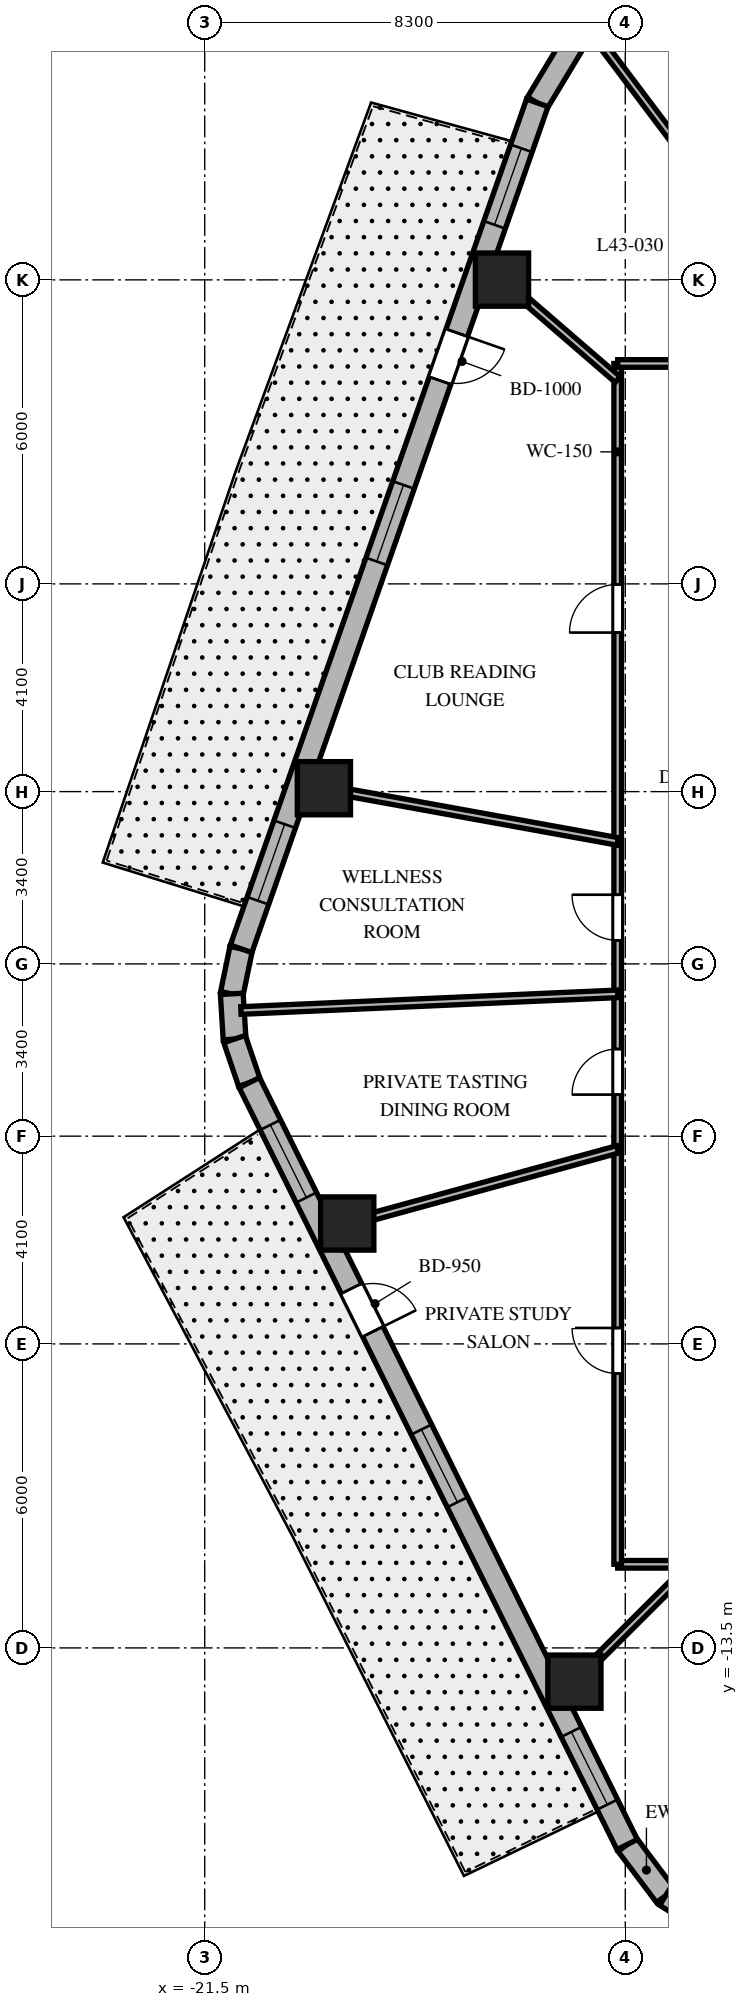
"""IFC4 building model, lengths in metres.
Left out: names, types, materials, properties, quantities, classifications, styles, units other than length and angle.
Written with IfcOpenShell. Run it as: python <this file> out.ifc"""

import sys

from ifc_helpers import new_model, si_unit, direction, frame, frame_2d, origin, origin_2d, place, context, subcontext, project, spatial, rectangle, extrude, element, fill, save


model = new_model("IFC4")
c1 = context("Model", 3, precision=1e-05, world=origin(), true_north=direction((0.0, 1.0)))
c2 = subcontext(c1, "Body", "Model", "MODEL_VIEW")
j1 = project(units=[si_unit("LENGTHUNIT", "METRE"), si_unit("PLANEANGLEUNIT", "RADIAN")], contexts=[c1])
p1 = place(None, origin())
s1 = spatial("IfcSite", under=j1, at=p1, CompositionType="ELEMENT")
p2 = place(p1, origin())
s2 = spatial("IfcBuilding", under=s1, at=p2, CompositionType="ELEMENT")
p3 = place(p2, frame((0.0, 0.0, 175.6)))
s3 = spatial("IfcBuildingStorey", under=s2, at=p3, CompositionType="ELEMENT", Elevation=175.6)
for number, where, z_axis, x_axis in (
    (1, (-15.633, 13.505, 0.0), (0.0, 0.0, 1.0), (1.0, 0.0, 0.0)),
    (2, (-19.148, 3.467, 0.0), (0.0, 0.0, 1.0), (1.0, 0.0, 0.0)),
    (3, (-18.687, -5.124, 0.0), (0.0, 0.0, 1.0), (1.0, 0.0, 0.0)),
    (4, (-14.204, -14.166, 0.0), (0.0, 0.0, 1.0), (1.0, 0.0, 0.0)),
):
    element("IfcColumn", number, at=place(p3, frame(where, z_axis=z_axis, x_axis=x_axis)), inside=s3, PredefinedType="COLUMN", context=c2, shape_type="SweptSolid", body=[
        extrude(rectangle(XDim=1.05, YDim=1.05, at=origin_2d()), origin(), (0.0, 0.0, 1.0), 3.7),
    ])
p4 = place(p3, frame((-13.162, -17.381, 0.0), z_axis=(0.0, 0.0, 1.0), x_axis=(0.601515770517, -0.798860925205, 0.0)))
e5 = element("IfcWall", 5, at=p4, inside=s3, PredefinedType="SOLIDWALL", context=c2, shape_type="SweptSolid", body=[
    extrude(rectangle(XDim=1.262, YDim=0.45, at=frame_2d((0.631, 0.0))), origin(), (0.0, 0.0, 1.0), 3.4),
])
p5 = place(p3, frame((-12.403, -18.389, 0.0), z_axis=(0.0, 0.0, 1.0), x_axis=(0.849795170926, -0.527113049991, 0.0)))
e6 = element("IfcWall", 6, at=p5, inside=s3, PredefinedType="SOLIDWALL", context=c2, shape_type="SweptSolid", body=[
    extrude(rectangle(XDim=1.241, YDim=0.45, at=frame_2d((0.62, 0.0))), origin(), (0.0, 0.0, 1.0), 3.4),
])
p6 = place(p3, frame((-14.214, 18.192, 0.0), z_axis=(0.0, 0.0, 1.0), x_axis=(-0.516340945502, -0.856383108193, 0.0)))
e7 = element("IfcWall", 7, at=p6, inside=s3, PredefinedType="SOLIDWALL", context=c2, shape_type="SweptSolid", body=[
    extrude(rectangle(XDim=1.4, YDim=0.45, at=frame_2d((0.7, 0.0))), origin(), (0.0, 0.0, 1.0), 3.4),
])
p7 = place(p3, frame((-20.782, 0.298, 0.0), z_axis=(0.0, 0.0, 1.0), x_axis=(-0.202570068411, -0.979267771033, 0.0)))
e8 = element("IfcWall", 8, at=p7, inside=s3, PredefinedType="SOLIDWALL", context=c2, shape_type="SweptSolid", body=[
    extrude(rectangle(XDim=0.909, YDim=0.45, at=frame_2d((0.454, 0.0))), origin(), (0.0, 0.0, 1.0), 3.4),
])
p8 = place(p3, frame((-20.966, -0.592, 0.0), z_axis=(0.0, 0.0, 1.0), x_axis=(0.061748898935, -0.998091715966, 0.0)))
e9 = element("IfcWall", 9, at=p8, inside=s3, PredefinedType="SOLIDWALL", context=c2, shape_type="SweptSolid", body=[
    extrude(rectangle(XDim=0.894, YDim=0.45, at=frame_2d((0.447, 0.0))), origin(), (0.0, 0.0, 1.0), 3.4),
])
p9 = place(p3, frame((-20.911, -1.484, 0.0), z_axis=(0.0, 0.0, 1.0), x_axis=(0.321623334353, -0.946867694453, 0.0)))
e10 = element("IfcWall", 10, at=p9, inside=s3, PredefinedType="SOLIDWALL", context=c2, shape_type="SweptSolid", body=[
    extrude(rectangle(XDim=0.909, YDim=0.45, at=frame_2d((0.454, 0.0))), origin(), (0.0, 0.0, 1.0), 3.4),
])
p10 = place(p3, frame((-14.937, 16.993, 0.0), z_axis=(0.0, 0.0, 1.0), x_axis=(-0.330431575061, -0.943829949834, 0.0)))
e11 = element("IfcWall", 11, at=p10, inside=s3, PredefinedType="SOLIDWALL", context=c2, shape_type="SweptSolid", body=[
    extrude(rectangle(XDim=17.689, YDim=0.45, at=frame_2d((8.844, 0.0))), origin(), (0.0, 0.0, 1.0), 3.4),
])
p11 = place(p10, frame((4.807, 0.0, 0.0)))
e12 = element("IfcOpeningElement", 12, at=p11, cuts=e11, PredefinedType="OPENING", context=c2, shape_type="SweptSolid", body=[
    extrude(rectangle(XDim=1.0, YDim=2.15, at=frame_2d((0.5, 1.075))), frame((0.0, 0.235, 0.0), z_axis=(0.0, -1.0, 0.0), x_axis=(1.0, 0.0, 0.0)), (0.0, 0.0, 1.0), 0.47),
])
p12 = place(p10, frame((0.95, 0.0, 0.8)))
e13 = element("IfcOpeningElement", 13, at=p12, cuts=e11, PredefinedType="OPENING", context=c2, shape_type="SweptSolid", body=[
    extrude(rectangle(XDim=1.6, YDim=1.75, at=frame_2d((0.8, 0.875))), frame((0.0, 0.235, 0.0), z_axis=(0.0, -1.0, 0.0), x_axis=(1.0, 0.0, 0.0)), (0.0, 0.0, 1.0), 0.47),
])
p13 = place(p10, frame((7.99, 0.0, 0.8)))
e14 = element("IfcOpeningElement", 14, at=p13, cuts=e11, PredefinedType="OPENING", context=c2, shape_type="SweptSolid", body=[
    extrude(rectangle(XDim=1.6, YDim=1.75, at=frame_2d((0.8, 0.875))), frame((0.0, 0.235, 0.0), z_axis=(0.0, -1.0, 0.0), x_axis=(1.0, 0.0, 0.0)), (0.0, 0.0, 1.0), 0.47),
])
p14 = place(p10, frame((15.084, 0.0, 0.8)))
e15 = element("IfcOpeningElement", 15, at=p14, cuts=e11, PredefinedType="OPENING", context=c2, shape_type="SweptSolid", body=[
    extrude(rectangle(XDim=1.6, YDim=1.75, at=frame_2d((0.8, 0.875))), frame((0.0, 0.235, 0.0), z_axis=(0.0, -1.0, 0.0), x_axis=(1.0, 0.0, 0.0)), (0.0, 0.0, 1.0), 0.47),
])
p15 = place(p3, frame((-20.618, -2.344, 0.0), z_axis=(0.0, 0.0, 1.0), x_axis=(0.444243691097, -0.895905990002, 0.0)))
e16 = element("IfcWall", 16, at=p15, inside=s3, PredefinedType="SOLIDWALL", context=c2, shape_type="SweptSolid", body=[
    extrude(rectangle(XDim=16.784, YDim=0.45, at=frame_2d((8.392, 0.0))), origin(), (0.0, 0.0, 1.0), 3.4),
])
p16 = place(p15, frame((4.535, 0.0, 0.0)))
e17 = element("IfcOpeningElement", 17, at=p16, cuts=e16, PredefinedType="OPENING", context=c2, shape_type="SweptSolid", body=[
    extrude(rectangle(XDim=0.95, YDim=2.15, at=frame_2d((0.475, 1.075))), frame((0.0, 0.235, 0.0), z_axis=(0.0, -1.0, 0.0), x_axis=(1.0, 0.0, 0.0)), (0.0, 0.0, 1.0), 0.47),
])
p17 = place(p15, frame((0.931, 0.0, 0.8)))
e18 = element("IfcOpeningElement", 18, at=p17, cuts=e16, PredefinedType="OPENING", context=c2, shape_type="SweptSolid", body=[
    extrude(rectangle(XDim=1.6, YDim=1.75, at=frame_2d((0.8, 0.875))), frame((0.0, 0.235, 0.0), z_axis=(0.0, -1.0, 0.0), x_axis=(1.0, 0.0, 0.0)), (0.0, 0.0, 1.0), 0.47),
])
p18 = place(p15, frame((7.642, 0.0, 0.8)))
e19 = element("IfcOpeningElement", 19, at=p18, cuts=e16, PredefinedType="OPENING", context=c2, shape_type="SweptSolid", body=[
    extrude(rectangle(XDim=1.6, YDim=1.75, at=frame_2d((0.8, 0.875))), frame((0.0, 0.235, 0.0), z_axis=(0.0, -1.0, 0.0), x_axis=(1.0, 0.0, 0.0)), (0.0, 0.0, 1.0), 0.47),
])
p19 = place(p15, frame((14.303, 0.0, 0.8)))
e20 = element("IfcOpeningElement", 20, at=p19, cuts=e16, PredefinedType="OPENING", context=c2, shape_type="SweptSolid", body=[
    extrude(rectangle(XDim=1.6, YDim=1.75, at=frame_2d((0.8, 0.875))), frame((0.0, 0.235, 0.0), z_axis=(0.0, -1.0, 0.0), x_axis=(1.0, 0.0, 0.0)), (0.0, 0.0, 1.0), 0.47),
])
p20 = place(p3, frame((13.35, -11.85, 0.0), z_axis=(0.0, 0.0, 1.0), x_axis=(-1.0, 0.0, 0.0)))
e21 = element("IfcWall", 21, at=p20, inside=s3, PredefinedType="PARTITIONING", context=c2, shape_type="SweptSolid", body=[
    extrude(rectangle(XDim=26.7, YDim=0.15, at=frame_2d((13.35, 0.0))), origin(), (0.0, 0.0, 1.0), 2.84),
])
p21 = place(p20, frame((22.7, 0.0, 0.0)))
e22 = element("IfcOpeningElement", 22, at=p21, cuts=e21, PredefinedType="OPENING", context=c2, shape_type="SweptSolid", body=[
    extrude(rectangle(XDim=0.9, YDim=2.03, at=frame_2d((0.45, 1.015))), frame((0.0, 0.085, 0.0), z_axis=(0.0, -1.0, 0.0), x_axis=(1.0, 0.0, 0.0)), (0.0, 0.0, 1.0), 0.17),
])
p22 = place(p20, frame((18.523, 0.0, 0.0)))
e23 = element("IfcOpeningElement", 23, at=p22, cuts=e21, PredefinedType="OPENING", context=c2, shape_type="SweptSolid", body=[
    extrude(rectangle(XDim=0.95, YDim=2.03, at=frame_2d((0.475, 1.015))), frame((0.0, 0.085, 0.0), z_axis=(0.0, -1.0, 0.0), x_axis=(1.0, 0.0, 0.0)), (0.0, 0.0, 1.0), 0.17),
])
p23 = place(p20, frame((14.469, 0.0, 0.0)))
e24 = element("IfcOpeningElement", 24, at=p23, cuts=e21, PredefinedType="OPENING", context=c2, shape_type="SweptSolid", body=[
    extrude(rectangle(XDim=0.95, YDim=2.03, at=frame_2d((0.475, 1.015))), frame((0.0, 0.085, 0.0), z_axis=(0.0, -1.0, 0.0), x_axis=(1.0, 0.0, 0.0)), (0.0, 0.0, 1.0), 0.17),
])
p24 = place(p20, frame((10.314, 0.0, 0.0)))
e25 = element("IfcOpeningElement", 25, at=p24, cuts=e21, PredefinedType="OPENING", context=c2, shape_type="SweptSolid", body=[
    extrude(rectangle(XDim=0.95, YDim=2.03, at=frame_2d((0.475, 1.015))), frame((0.0, 0.085, 0.0), z_axis=(0.0, -1.0, 0.0), x_axis=(1.0, 0.0, 0.0)), (0.0, 0.0, 1.0), 0.17),
])
p25 = place(p20, frame((3.995, 0.0, 0.0)))
e26 = element("IfcOpeningElement", 26, at=p25, cuts=e21, PredefinedType="OPENING", context=c2, shape_type="SweptSolid", body=[
    extrude(rectangle(XDim=0.95, YDim=2.03, at=frame_2d((0.475, 1.015))), frame((0.0, 0.085, 0.0), z_axis=(0.0, -1.0, 0.0), x_axis=(1.0, 0.0, 0.0)), (0.0, 0.0, 1.0), 0.17),
])
p26 = place(p3, frame((-13.35, -11.85, 0.0), z_axis=(0.0, 0.0, 1.0), x_axis=(0.0, 1.0, 0.0)))
e27 = element("IfcWall", 27, at=p26, inside=s3, PredefinedType="PARTITIONING", context=c2, shape_type="SweptSolid", body=[
    extrude(rectangle(XDim=23.7, YDim=0.15, at=frame_2d((11.85, 0.0))), origin(), (0.0, 0.0, 1.0), 2.84),
])
p27 = place(p26, frame((18.389, 0.0, 0.0)))
e28 = element("IfcOpeningElement", 28, at=p27, cuts=e27, PredefinedType="OPENING", context=c2, shape_type="SweptSolid", body=[
    extrude(rectangle(XDim=0.95, YDim=2.03, at=frame_2d((0.475, 1.015))), frame((0.0, 0.085, 0.0), z_axis=(0.0, -1.0, 0.0), x_axis=(1.0, 0.0, 0.0)), (0.0, 0.0, 1.0), 0.17),
])
p28 = place(p26, frame((12.315, 0.0, 0.0)))
e29 = element("IfcOpeningElement", 29, at=p28, cuts=e27, PredefinedType="OPENING", context=c2, shape_type="SweptSolid", body=[
    extrude(rectangle(XDim=0.9, YDim=2.03, at=frame_2d((0.45, 1.015))), frame((0.0, 0.085, 0.0), z_axis=(0.0, -1.0, 0.0), x_axis=(1.0, 0.0, 0.0)), (0.0, 0.0, 1.0), 0.17),
])
p29 = place(p26, frame((9.27, 0.0, 0.0)))
e30 = element("IfcOpeningElement", 30, at=p29, cuts=e27, PredefinedType="OPENING", context=c2, shape_type="SweptSolid", body=[
    extrude(rectangle(XDim=0.9, YDim=2.03, at=frame_2d((0.45, 1.015))), frame((0.0, 0.085, 0.0), z_axis=(0.0, -1.0, 0.0), x_axis=(1.0, 0.0, 0.0)), (0.0, 0.0, 1.0), 0.17),
])
p30 = place(p26, frame((3.765, 0.0, 0.0)))
e31 = element("IfcOpeningElement", 31, at=p30, cuts=e27, PredefinedType="OPENING", context=c2, shape_type="SweptSolid", body=[
    extrude(rectangle(XDim=0.9, YDim=2.03, at=frame_2d((0.45, 1.015))), frame((0.0, 0.085, 0.0), z_axis=(0.0, -1.0, 0.0), x_axis=(1.0, 0.0, 0.0)), (0.0, 0.0, 1.0), 0.17),
])
p31 = place(p3, frame((-13.35, 11.85, 0.0), z_axis=(0.0, 0.0, 1.0), x_axis=(1.0, 0.0, 0.0)))
e32 = element("IfcWall", 32, at=p31, inside=s3, PredefinedType="PARTITIONING", context=c2, shape_type="SweptSolid", body=[
    extrude(rectangle(XDim=26.7, YDim=0.15, at=frame_2d((13.35, 0.0))), origin(), (0.0, 0.0, 1.0), 2.84),
])
p32 = place(p31, frame((22.7, 0.0, 0.0)))
e33 = element("IfcOpeningElement", 33, at=p32, cuts=e32, PredefinedType="OPENING", context=c2, shape_type="SweptSolid", body=[
    extrude(rectangle(XDim=0.9, YDim=2.03, at=frame_2d((0.45, 1.015))), frame((0.0, 0.085, 0.0), z_axis=(0.0, -1.0, 0.0), x_axis=(1.0, 0.0, 0.0)), (0.0, 0.0, 1.0), 0.17),
])
p33 = place(p31, frame((18.523, 0.0, 0.0)))
e34 = element("IfcOpeningElement", 34, at=p33, cuts=e32, PredefinedType="OPENING", context=c2, shape_type="SweptSolid", body=[
    extrude(rectangle(XDim=0.95, YDim=2.03, at=frame_2d((0.475, 1.015))), frame((0.0, 0.085, 0.0), z_axis=(0.0, -1.0, 0.0), x_axis=(1.0, 0.0, 0.0)), (0.0, 0.0, 1.0), 0.17),
])
p34 = place(p31, frame((14.469, 0.0, 0.0)))
e35 = element("IfcOpeningElement", 35, at=p34, cuts=e32, PredefinedType="OPENING", context=c2, shape_type="SweptSolid", body=[
    extrude(rectangle(XDim=0.95, YDim=2.03, at=frame_2d((0.475, 1.015))), frame((0.0, 0.085, 0.0), z_axis=(0.0, -1.0, 0.0), x_axis=(1.0, 0.0, 0.0)), (0.0, 0.0, 1.0), 0.17),
])
p35 = place(p31, frame((10.314, 0.0, 0.0)))
e36 = element("IfcOpeningElement", 36, at=p35, cuts=e32, PredefinedType="OPENING", context=c2, shape_type="SweptSolid", body=[
    extrude(rectangle(XDim=0.95, YDim=2.03, at=frame_2d((0.475, 1.015))), frame((0.0, 0.085, 0.0), z_axis=(0.0, -1.0, 0.0), x_axis=(1.0, 0.0, 0.0)), (0.0, 0.0, 1.0), 0.17),
])
p36 = place(p31, frame((6.061, 0.0, 0.0)))
e37 = element("IfcOpeningElement", 37, at=p36, cuts=e32, PredefinedType="OPENING", context=c2, shape_type="SweptSolid", body=[
    extrude(rectangle(XDim=0.95, YDim=2.03, at=frame_2d((0.475, 1.015))), frame((0.0, 0.085, 0.0), z_axis=(0.0, -1.0, 0.0), x_axis=(1.0, 0.0, 0.0)), (0.0, 0.0, 1.0), 0.17),
])
p37 = place(p31, frame((1.886, 0.0, 0.0)))
e38 = element("IfcOpeningElement", 38, at=p37, cuts=e32, PredefinedType="OPENING", context=c2, shape_type="SweptSolid", body=[
    extrude(rectangle(XDim=0.9, YDim=2.03, at=frame_2d((0.45, 1.015))), frame((0.0, 0.085, 0.0), z_axis=(0.0, -1.0, 0.0), x_axis=(1.0, 0.0, 0.0)), (0.0, 0.0, 1.0), 0.17),
])
p38 = place(p3, frame((-8.918, 11.85, 0.0), z_axis=(0.0, 0.0, 1.0), x_axis=(-0.601347965064, 0.798987249531, 0.0)))
e39 = element("IfcWall", 39, at=p38, inside=s3, PredefinedType="PARTITIONING", context=c2, shape_type="SweptSolid", body=[
    extrude(rectangle(XDim=8.08, YDim=0.15, at=frame_2d((4.04, 0.0))), origin(), (0.0, 0.0, 1.0), 2.64),
])
p39 = place(p3, frame((-13.35, 11.533, 0.0), z_axis=(0.0, 0.0, 1.0), x_axis=(-0.756711647314, 0.65374879183, 0.0)))
e40 = element("IfcWall", 40, at=p39, inside=s3, PredefinedType="PARTITIONING", context=c2, shape_type="SweptSolid", body=[
    extrude(rectangle(XDim=3.55, YDim=0.15, at=frame_2d((1.775, 0.0))), origin(), (0.0, 0.0, 1.0), 2.64),
])
p40 = place(p3, frame((-13.35, 2.417, 0.0), z_axis=(0.0, 0.0, 1.0), x_axis=(-0.98399796473, 0.178179699761, 0.0)))
e41 = element("IfcWall", 41, at=p40, inside=s3, PredefinedType="PARTITIONING", context=c2, shape_type="SweptSolid", body=[
    extrude(rectangle(XDim=6.393, YDim=0.15, at=frame_2d((3.197, 0.0))), origin(), (0.0, 0.0, 1.0), 2.64),
])
p41 = place(p3, frame((-13.35, -0.591, 0.0), z_axis=(0.0, 0.0, 1.0), x_axis=(-0.999020359631, -0.044252921296, 0.0)))
e42 = element("IfcWall", 42, at=p41, inside=s3, PredefinedType="PARTITIONING", context=c2, shape_type="SweptSolid", body=[
    extrude(rectangle(XDim=7.442, YDim=0.15, at=frame_2d((3.721, 0.0))), origin(), (0.0, 0.0, 1.0), 2.64),
])
p42 = place(p3, frame((-13.35, -3.661, 0.0), z_axis=(0.0, 0.0, 1.0), x_axis=(-0.964397145454, -0.264458211898, 0.0)))
e43 = element("IfcWall", 43, at=p42, inside=s3, PredefinedType="PARTITIONING", context=c2, shape_type="SweptSolid", body=[
    extrude(rectangle(XDim=6.039, YDim=0.15, at=frame_2d((3.019, 0.0))), origin(), (0.0, 0.0, 1.0), 2.64),
])
p43 = place(p3, frame((-11.882, -11.85, 0.0), z_axis=(0.0, 0.0, 1.0), x_axis=(-0.708037373639, -0.706174962407, 0.0)))
e44 = element("IfcWall", 44, at=p43, inside=s3, PredefinedType="PARTITIONING", context=c2, shape_type="SweptSolid", body=[
    extrude(rectangle(XDim=3.802, YDim=0.15, at=frame_2d((1.901, 0.0))), origin(), (0.0, 0.0, 1.0), 2.64),
])
p44 = place(p11, origin())
e45 = element("IfcDoor", 45, at=p44, inside=s3, OperationType="SINGLE_SWING_LEFT", PredefinedType="DOOR", context=c2, shape_type="SweptSolid", body=[
    extrude(rectangle(XDim=1.0, YDim=2.15, at=frame_2d((0.5, 1.075))), frame((0.0, 0.025, 0.0), z_axis=(0.0, -1.0, 0.0), x_axis=(1.0, 0.0, 0.0)), (0.0, 0.0, 1.0), 0.05),
])
fill(e12, e45)
p45 = place(p12, origin())
e46 = element("IfcWindow", 46, at=p45, inside=s3, PartitioningType="SINGLE_PANEL", PredefinedType="WINDOW", context=c2, shape_type="SweptSolid", body=[
    extrude(rectangle(XDim=1.6, YDim=1.75, at=frame_2d((0.8, 0.875))), frame((0.0, 0.03, 0.0), z_axis=(0.0, -1.0, 0.0), x_axis=(1.0, 0.0, 0.0)), (0.0, 0.0, 1.0), 0.06),
])
fill(e13, e46)
p46 = place(p13, origin())
e47 = element("IfcWindow", 47, at=p46, inside=s3, PartitioningType="SINGLE_PANEL", PredefinedType="WINDOW", context=c2, shape_type="SweptSolid", body=[
    extrude(rectangle(XDim=1.6, YDim=1.75, at=frame_2d((0.8, 0.875))), frame((0.0, 0.03, 0.0), z_axis=(0.0, -1.0, 0.0), x_axis=(1.0, 0.0, 0.0)), (0.0, 0.0, 1.0), 0.06),
])
fill(e14, e47)
p47 = place(p14, origin())
e48 = element("IfcWindow", 48, at=p47, inside=s3, PartitioningType="SINGLE_PANEL", PredefinedType="WINDOW", context=c2, shape_type="SweptSolid", body=[
    extrude(rectangle(XDim=1.6, YDim=1.75, at=frame_2d((0.8, 0.875))), frame((0.0, 0.03, 0.0), z_axis=(0.0, -1.0, 0.0), x_axis=(1.0, 0.0, 0.0)), (0.0, 0.0, 1.0), 0.06),
])
fill(e15, e48)
p48 = place(p16, origin())
e49 = element("IfcDoor", 49, at=p48, inside=s3, OperationType="SINGLE_SWING_RIGHT", PredefinedType="DOOR", context=c2, shape_type="SweptSolid", body=[
    extrude(rectangle(XDim=0.95, YDim=2.15, at=frame_2d((0.475, 1.075))), frame((0.0, 0.025, 0.0), z_axis=(0.0, -1.0, 0.0), x_axis=(1.0, 0.0, 0.0)), (0.0, 0.0, 1.0), 0.05),
])
fill(e17, e49)
p49 = place(p17, origin())
e50 = element("IfcWindow", 50, at=p49, inside=s3, PartitioningType="SINGLE_PANEL", PredefinedType="WINDOW", context=c2, shape_type="SweptSolid", body=[
    extrude(rectangle(XDim=1.6, YDim=1.75, at=frame_2d((0.8, 0.875))), frame((0.0, 0.03, 0.0), z_axis=(0.0, -1.0, 0.0), x_axis=(1.0, 0.0, 0.0)), (0.0, 0.0, 1.0), 0.06),
])
fill(e18, e50)
p50 = place(p18, origin())
e51 = element("IfcWindow", 51, at=p50, inside=s3, PartitioningType="SINGLE_PANEL", PredefinedType="WINDOW", context=c2, shape_type="SweptSolid", body=[
    extrude(rectangle(XDim=1.6, YDim=1.75, at=frame_2d((0.8, 0.875))), frame((0.0, 0.03, 0.0), z_axis=(0.0, -1.0, 0.0), x_axis=(1.0, 0.0, 0.0)), (0.0, 0.0, 1.0), 0.06),
])
fill(e19, e51)
p51 = place(p19, origin())
e52 = element("IfcWindow", 52, at=p51, inside=s3, PartitioningType="SINGLE_PANEL", PredefinedType="WINDOW", context=c2, shape_type="SweptSolid", body=[
    extrude(rectangle(XDim=1.6, YDim=1.75, at=frame_2d((0.8, 0.875))), frame((0.0, 0.03, 0.0), z_axis=(0.0, -1.0, 0.0), x_axis=(1.0, 0.0, 0.0)), (0.0, 0.0, 1.0), 0.06),
])
fill(e20, e52)
p52 = place(p27, origin())
e53 = element("IfcDoor", 53, at=p52, inside=s3, OperationType="SINGLE_SWING_LEFT", PredefinedType="DOOR", context=c2, shape_type="SweptSolid", body=[
    extrude(rectangle(XDim=0.95, YDim=2.03, at=frame_2d((0.475, 1.015))), frame((0.0, 0.025, 0.0), z_axis=(0.0, -1.0, 0.0), x_axis=(1.0, 0.0, 0.0)), (0.0, 0.0, 1.0), 0.05),
])
fill(e28, e53)
p53 = place(p28, origin())
e54 = element("IfcDoor", 54, at=p53, inside=s3, OperationType="SINGLE_SWING_RIGHT", PredefinedType="DOOR", context=c2, shape_type="SweptSolid", body=[
    extrude(rectangle(XDim=0.9, YDim=2.03, at=frame_2d((0.45, 1.015))), frame((0.0, 0.025, 0.0), z_axis=(0.0, -1.0, 0.0), x_axis=(1.0, 0.0, 0.0)), (0.0, 0.0, 1.0), 0.05),
])
fill(e29, e54)
p54 = place(p29, origin())
e55 = element("IfcDoor", 55, at=p54, inside=s3, OperationType="SINGLE_SWING_LEFT", PredefinedType="DOOR", context=c2, shape_type="SweptSolid", body=[
    extrude(rectangle(XDim=0.9, YDim=2.03, at=frame_2d((0.45, 1.015))), frame((0.0, 0.025, 0.0), z_axis=(0.0, -1.0, 0.0), x_axis=(1.0, 0.0, 0.0)), (0.0, 0.0, 1.0), 0.05),
])
fill(e30, e55)
p55 = place(p30, origin())
e56 = element("IfcDoor", 56, at=p55, inside=s3, OperationType="SINGLE_SWING_RIGHT", PredefinedType="DOOR", context=c2, shape_type="SweptSolid", body=[
    extrude(rectangle(XDim=0.9, YDim=2.03, at=frame_2d((0.45, 1.015))), frame((0.0, 0.025, 0.0), z_axis=(0.0, -1.0, 0.0), x_axis=(1.0, 0.0, 0.0)), (0.0, 0.0, 1.0), 0.05),
])
fill(e31, e56)
save(model, sys.argv[1])
